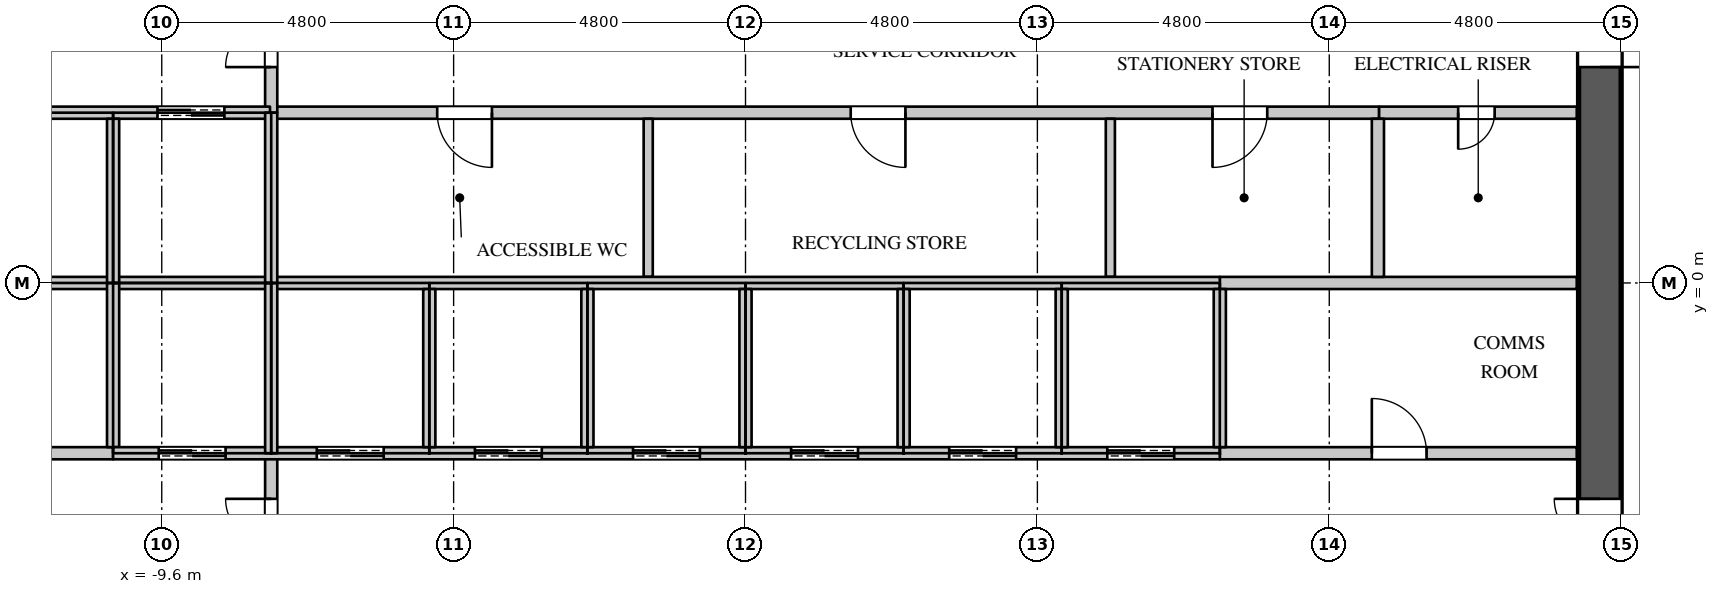
"""IFC4 building model, lengths in metres.
Left out: names, types, materials, properties, quantities, classifications, styles, units other than length and angle.
Written with IfcOpenShell. Run it as: python <this file> out.ifc"""

import sys

from ifc_helpers import new_model, si_unit, direction, frame, frame_2d, origin, place, context, subcontext, project, spatial, rectangle, extrude, element, fill, save


model = new_model("IFC4")
c1 = context("Model", 3, precision=1e-05, world=origin(), true_north=direction((0.0, 1.0)))
c2 = subcontext(c1, "Body", "Model", "MODEL_VIEW")
j1 = project(units=[si_unit("LENGTHUNIT", "METRE"), si_unit("PLANEANGLEUNIT", "RADIAN")], contexts=[c1])
p1 = place(None, origin())
s1 = spatial("IfcSite", under=j1, at=p1, CompositionType="ELEMENT")
p2 = place(p1, origin())
s2 = spatial("IfcBuilding", under=s1, at=p2, CompositionType="ELEMENT")
p3 = place(p2, frame((0.0, 0.0, 162.3)))
s3 = spatial("IfcBuildingStorey", under=s2, at=p3, CompositionType="ELEMENT", Elevation=162.3)
p4 = place(p3, frame((14.05, -11.3, 0.0), z_axis=(0.0, 0.0, 1.0), x_axis=(0.0, 1.0, 0.0)))
e1 = element("IfcWall", 1, at=p4, inside=s3, PredefinedType="SHEAR", context=c2, shape_type="SweptSolid", body=[
    extrude(rectangle(XDim=22.6, YDim=0.7, at=frame_2d((11.3, 0.0))), origin(), (0.0, 0.0, 1.0), 4.2),
])
p5 = place(p4, frame((20.35, 0.0, 0.0)))
e2 = element("IfcOpeningElement", 2, at=p5, cuts=e1, PredefinedType="OPENING", context=c2, shape_type="SweptSolid", body=[
    extrude(rectangle(XDim=1.1, YDim=2.2, at=frame_2d((0.55, 1.1))), frame((0.0, 0.36, 0.0), z_axis=(0.0, -1.0, 0.0), x_axis=(1.0, 0.0, 0.0)), (0.0, 0.0, 1.0), 0.72),
])
p6 = place(p4, frame((1.15, 0.0, 0.0)))
e3 = element("IfcOpeningElement", 3, at=p6, cuts=e1, PredefinedType="OPENING", context=c2, shape_type="SweptSolid", body=[
    extrude(rectangle(XDim=1.1, YDim=2.2, at=frame_2d((0.55, 1.1))), frame((0.0, 0.36, 0.0), z_axis=(0.0, -1.0, 0.0), x_axis=(1.0, 0.0, 0.0)), (0.0, 0.0, 1.0), 0.72),
])
p7 = place(p4, frame((14.85, 0.0, 0.0)))
e4 = element("IfcOpeningElement", 4, at=p7, cuts=e1, PredefinedType="OPENING", context=c2, shape_type="SweptSolid", body=[
    extrude(rectangle(XDim=1.5, YDim=2.4, at=frame_2d((0.75, 1.2))), frame((0.0, 0.36, 0.0), z_axis=(0.0, -1.0, 0.0), x_axis=(1.0, 0.0, 0.0)), (0.0, 0.0, 1.0), 0.72),
])
p8 = place(p4, frame((6.25, 0.0, 0.0)))
e5 = element("IfcOpeningElement", 5, at=p8, cuts=e1, PredefinedType="OPENING", context=c2, shape_type="SweptSolid", body=[
    extrude(rectangle(XDim=1.5, YDim=2.4, at=frame_2d((0.75, 1.2))), frame((0.0, 0.36, 0.0), z_axis=(0.0, -1.0, 0.0), x_axis=(1.0, 0.0, 0.0)), (0.0, 0.0, 1.0), 0.72),
])
p9 = place(p3, frame((-7.82, 2.8, 0.0), z_axis=(0.0, 0.0, 1.0), x_axis=(1.0, 0.0, 0.0)))
e6 = element("IfcWall", 6, at=p9, inside=s3, PredefinedType="PARTITIONING", context=c2, shape_type="SweptSolid", body=[
    extrude(rectangle(XDim=18.24, YDim=0.2, at=frame_2d((9.12, 0.0))), origin(), (0.0, 0.0, 1.0), 3.95),
])
p10 = place(p9, frame((2.75, 0.0, 0.0)))
e7 = element("IfcOpeningElement", 7, at=p10, cuts=e6, PredefinedType="OPENING", context=c2, shape_type="SweptSolid", body=[
    extrude(rectangle(XDim=0.9, YDim=2.2, at=frame_2d((0.45, 1.1))), frame((0.0, 0.11, 0.0), z_axis=(0.0, -1.0, 0.0), x_axis=(1.0, 0.0, 0.0)), (0.0, 0.0, 1.0), 0.22),
])
p11 = place(p9, frame((9.55, 0.0, 0.0)))
e8 = element("IfcOpeningElement", 8, at=p11, cuts=e6, PredefinedType="OPENING", context=c2, shape_type="SweptSolid", body=[
    extrude(rectangle(XDim=0.9, YDim=2.2, at=frame_2d((0.45, 1.1))), frame((0.0, 0.11, 0.0), z_axis=(0.0, -1.0, 0.0), x_axis=(1.0, 0.0, 0.0)), (0.0, 0.0, 1.0), 0.22),
])
p12 = place(p9, frame((15.5, 0.0, 0.0)))
e9 = element("IfcOpeningElement", 9, at=p12, cuts=e6, PredefinedType="OPENING", context=c2, shape_type="SweptSolid", body=[
    extrude(rectangle(XDim=0.9, YDim=2.2, at=frame_2d((0.45, 1.1))), frame((0.0, 0.11, 0.0), z_axis=(0.0, -1.0, 0.0), x_axis=(1.0, 0.0, 0.0)), (0.0, 0.0, 1.0), 0.22),
])
p13 = place(p3, frame((-7.8, -5.8, 0.0), z_axis=(0.0, 0.0, 1.0), x_axis=(0.0, 1.0, 0.0)))
e10 = element("IfcWall", 10, at=p13, inside=s3, PredefinedType="PARTITIONING", context=c2, shape_type="SweptSolid", body=[
    extrude(rectangle(XDim=3.0, YDim=0.2, at=frame_2d((1.5, 0.0))), origin(), (0.0, 0.0, 1.0), 3.95),
])
p14 = place(p13, frame((0.75, 0.0, 0.0)))
e11 = element("IfcOpeningElement", 11, at=p14, cuts=e10, PredefinedType="OPENING", context=c2, shape_type="SweptSolid", body=[
    extrude(rectangle(XDim=1.5, YDim=2.4, at=frame_2d((0.75, 1.2))), frame((0.0, 0.11, 0.0), z_axis=(0.0, -1.0, 0.0), x_axis=(1.0, 0.0, 0.0)), (0.0, 0.0, 1.0), 0.22),
])
p15 = place(p3, frame((-7.8, 2.8, 0.0), z_axis=(0.0, 0.0, 1.0), x_axis=(0.0, 1.0, 0.0)))
e12 = element("IfcWall", 12, at=p15, inside=s3, PredefinedType="PARTITIONING", context=c2, shape_type="SweptSolid", body=[
    extrude(rectangle(XDim=5.275, YDim=0.2, at=frame_2d((2.637, 0.0))), origin(), (0.0, 0.0, 1.0), 3.95),
])
p16 = place(p15, frame((0.75, 0.0, 0.0)))
e13 = element("IfcOpeningElement", 13, at=p16, cuts=e12, PredefinedType="OPENING", context=c2, shape_type="SweptSolid", body=[
    extrude(rectangle(XDim=1.5, YDim=2.4, at=frame_2d((0.75, 1.2))), frame((0.0, 0.11, 0.0), z_axis=(0.0, -1.0, 0.0), x_axis=(1.0, 0.0, 0.0)), (0.0, 0.0, 1.0), 0.22),
])
for number, where, z_axis, x_axis in (
    (14, (-1.6, 0.1, 0.0), (0.0, 0.0, 1.0), (0.0, 1.0, 0.0)),
    (15, (6.0, 0.1, 0.0), (0.0, 0.0, 1.0), (0.0, 1.0, 0.0)),
):
    element("IfcWall", number, at=place(p3, frame(where, z_axis=z_axis, x_axis=x_axis)), inside=s3, PredefinedType="PARTITIONING", context=c2, shape_type="SweptSolid", body=[
        extrude(rectangle(XDim=2.6, YDim=0.15, at=frame_2d((1.3, 0.0))), origin(), (0.0, 0.0, 1.0), 3.95),
    ])
p17 = place(p3, frame((-13.67, -2.8, 0.0), z_axis=(0.0, 0.0, 1.0), x_axis=(1.0, 0.0, 0.0)))
e16 = element("IfcWall", 16, at=p17, inside=s3, PredefinedType="PARTITIONING", context=c2, shape_type="SweptSolid", body=[
    extrude(rectangle(XDim=3.27, YDim=0.2, at=frame_2d((1.635, 0.0))), origin(), (0.0, 0.0, 1.0), 3.95),
])
p18 = place(p17, frame((1.3, 0.0, 0.0)))
e17 = element("IfcOpeningElement", 17, at=p18, cuts=e16, PredefinedType="OPENING", context=c2, shape_type="SweptSolid", body=[
    extrude(rectangle(XDim=0.6, YDim=2.0, at=frame_2d((0.3, 1.0))), frame((0.0, 0.11, 0.0), z_axis=(0.0, -1.0, 0.0), x_axis=(1.0, 0.0, 0.0)), (0.0, 0.0, 1.0), 0.22),
])
p19 = place(p3, frame((7.8, -2.8, 0.0), z_axis=(0.0, 0.0, 1.0), x_axis=(1.0, 0.0, 0.0)))
e18 = element("IfcWall", 18, at=p19, inside=s3, PredefinedType="PARTITIONING", context=c2, shape_type="SweptSolid", body=[
    extrude(rectangle(XDim=5.87, YDim=0.2, at=frame_2d((2.935, 0.0))), origin(), (0.0, 0.0, 1.0), 3.95),
])
p20 = place(p19, frame((2.5, 0.0, 0.0)))
e19 = element("IfcOpeningElement", 19, at=p20, cuts=e18, PredefinedType="OPENING", context=c2, shape_type="SweptSolid", body=[
    extrude(rectangle(XDim=0.9, YDim=2.2, at=frame_2d((0.45, 1.1))), frame((0.0, 0.11, 0.0), z_axis=(0.0, -1.0, 0.0), x_axis=(1.0, 0.0, 0.0)), (0.0, 0.0, 1.0), 0.22),
])
p21 = place(p3, frame((7.8, 0.0, 0.0), z_axis=(0.0, 0.0, 1.0), x_axis=(1.0, 0.0, 0.0)))
e20 = element("IfcWall", 20, at=p21, inside=s3, PredefinedType="PARTITIONING", context=c2, shape_type="SweptSolid", body=[
    extrude(rectangle(XDim=5.87, YDim=0.2, at=frame_2d((2.935, 0.0))), origin(), (0.0, 0.0, 1.0), 3.95),
])
p22 = place(p3, frame((10.42, 2.8, 0.0), z_axis=(0.0, 0.0, 1.0), x_axis=(1.0, 0.0, 0.0)))
e21 = element("IfcWall", 21, at=p22, inside=s3, PredefinedType="PARTITIONING", context=c2, shape_type="SweptSolid", body=[
    extrude(rectangle(XDim=3.25, YDim=0.2, at=frame_2d((1.625, 0.0))), origin(), (0.0, 0.0, 1.0), 3.95),
])
p23 = place(p22, frame((1.3, 0.0, 0.0)))
e22 = element("IfcOpeningElement", 22, at=p23, cuts=e21, PredefinedType="OPENING", context=c2, shape_type="SweptSolid", body=[
    extrude(rectangle(XDim=0.6, YDim=2.0, at=frame_2d((0.3, 1.0))), frame((0.0, 0.11, 0.0), z_axis=(0.0, -1.0, 0.0), x_axis=(1.0, 0.0, 0.0)), (0.0, 0.0, 1.0), 0.22),
])
p24 = place(p3, frame((10.4, 0.1, 0.0), z_axis=(0.0, 0.0, 1.0), x_axis=(0.0, 1.0, 0.0)))
e23 = element("IfcWall", 23, at=p24, inside=s3, PredefinedType="PARTITIONING", context=c2, shape_type="SweptSolid", body=[
    extrude(rectangle(XDim=2.6, YDim=0.2, at=frame_2d((1.3, 0.0))), origin(), (0.0, 0.0, 1.0), 3.95),
])
p25 = place(p3, frame((-13.67, 0.0, 0.0), z_axis=(0.0, 0.0, 1.0), x_axis=(1.0, 0.0, 0.0)))
e24 = element("IfcWall", 24, at=p25, inside=s3, PredefinedType="PARTITIONING", context=c2, shape_type="SweptSolid", body=[
    extrude(rectangle(XDim=21.47, YDim=0.2, at=frame_2d((10.735, 0.0))), origin(), (0.0, 0.0, 1.0), 3.95),
])
p26 = place(p3, frame((-13.67, 2.8, 0.0), z_axis=(0.0, 0.0, 1.0), x_axis=(1.0, 0.0, 0.0)))
e25 = element("IfcWall", 25, at=p26, inside=s3, PredefinedType="PARTITIONING", context=c2, shape_type="SweptSolid", body=[
    extrude(rectangle(XDim=5.85, YDim=0.2, at=frame_2d((2.925, 0.0))), origin(), (0.0, 0.0, 1.0), 3.95),
])
p27 = place(p26, frame((1.05, 0.0, 0.0)))
e26 = element("IfcOpeningElement", 26, at=p27, cuts=e25, PredefinedType="OPENING", context=c2, shape_type="SweptSolid", body=[
    extrude(rectangle(XDim=1.1, YDim=2.2, at=frame_2d((0.55, 1.1))), frame((0.0, 0.11, 0.0), z_axis=(0.0, -1.0, 0.0), x_axis=(1.0, 0.0, 0.0)), (0.0, 0.0, 1.0), 0.22),
])
p28 = place(p26, frame((4.0, 0.0, 0.0)))
e27 = element("IfcOpeningElement", 27, at=p28, cuts=e25, PredefinedType="OPENING", context=c2, shape_type="SweptSolid", body=[
    extrude(rectangle(XDim=1.1, YDim=2.2, at=frame_2d((0.55, 1.1))), frame((0.0, 0.11, 0.0), z_axis=(0.0, -1.0, 0.0), x_axis=(1.0, 0.0, 0.0)), (0.0, 0.0, 1.0), 0.22),
])
p29 = place(p3, frame((-10.4, -2.7, 0.0), z_axis=(0.0, 0.0, 1.0), x_axis=(0.0, 1.0, 0.0)))
e28 = element("IfcWall", 28, at=p29, inside=s3, PredefinedType="PARTITIONING", context=c2, shape_type="SweptSolid", body=[
    extrude(rectangle(XDim=2.7, YDim=0.2, at=frame_2d((1.35, 0.0))), origin(), (0.0, 0.0, 1.0), 3.95),
])
p30 = place(p3, frame((-10.4, -2.8, 0.0), z_axis=(0.0, 0.0, 1.0), x_axis=(1.0, 0.0, 0.0)))
e29 = element("IfcWall", 29, at=p30, inside=s3, PredefinedType="PARTITIONING", context=c2, shape_type="SweptSolid", body=[
    extrude(rectangle(XDim=18.2, YDim=0.2, at=frame_2d((9.1, 0.0))), origin(), (0.0, 0.0, 1.0), 3.95),
])
p31 = place(p30, frame((0.75, 0.0, 0.0)))
e30 = element("IfcOpeningElement", 30, at=p31, cuts=e29, PredefinedType="OPENING", context=c2, shape_type="SweptSolid", body=[
    extrude(rectangle(XDim=1.1, YDim=2.2, at=frame_2d((0.55, 1.1))), frame((0.0, 0.11, 0.0), z_axis=(0.0, -1.0, 0.0), x_axis=(1.0, 0.0, 0.0)), (0.0, 0.0, 1.0), 0.22),
])
p32 = place(p30, frame((3.35, 0.0, 0.0)))
e31 = element("IfcOpeningElement", 31, at=p32, cuts=e29, PredefinedType="OPENING", context=c2, shape_type="SweptSolid", body=[
    extrude(rectangle(XDim=1.1, YDim=2.2, at=frame_2d((0.55, 1.1))), frame((0.0, 0.11, 0.0), z_axis=(0.0, -1.0, 0.0), x_axis=(1.0, 0.0, 0.0)), (0.0, 0.0, 1.0), 0.22),
])
p33 = place(p30, frame((5.95, 0.0, 0.0)))
e32 = element("IfcOpeningElement", 32, at=p33, cuts=e29, PredefinedType="OPENING", context=c2, shape_type="SweptSolid", body=[
    extrude(rectangle(XDim=1.1, YDim=2.2, at=frame_2d((0.55, 1.1))), frame((0.0, 0.11, 0.0), z_axis=(0.0, -1.0, 0.0), x_axis=(1.0, 0.0, 0.0)), (0.0, 0.0, 1.0), 0.22),
])
p34 = place(p30, frame((8.55, 0.0, 0.0)))
e33 = element("IfcOpeningElement", 33, at=p34, cuts=e29, PredefinedType="OPENING", context=c2, shape_type="SweptSolid", body=[
    extrude(rectangle(XDim=1.1, YDim=2.2, at=frame_2d((0.55, 1.1))), frame((0.0, 0.11, 0.0), z_axis=(0.0, -1.0, 0.0), x_axis=(1.0, 0.0, 0.0)), (0.0, 0.0, 1.0), 0.22),
])
p35 = place(p30, frame((11.15, 0.0, 0.0)))
e34 = element("IfcOpeningElement", 34, at=p35, cuts=e29, PredefinedType="OPENING", context=c2, shape_type="SweptSolid", body=[
    extrude(rectangle(XDim=1.1, YDim=2.2, at=frame_2d((0.55, 1.1))), frame((0.0, 0.11, 0.0), z_axis=(0.0, -1.0, 0.0), x_axis=(1.0, 0.0, 0.0)), (0.0, 0.0, 1.0), 0.22),
])
p36 = place(p30, frame((13.75, 0.0, 0.0)))
e35 = element("IfcOpeningElement", 35, at=p36, cuts=e29, PredefinedType="OPENING", context=c2, shape_type="SweptSolid", body=[
    extrude(rectangle(XDim=1.1, YDim=2.2, at=frame_2d((0.55, 1.1))), frame((0.0, 0.11, 0.0), z_axis=(0.0, -1.0, 0.0), x_axis=(1.0, 0.0, 0.0)), (0.0, 0.0, 1.0), 0.22),
])
p37 = place(p30, frame((16.35, 0.0, 0.0)))
e36 = element("IfcOpeningElement", 36, at=p37, cuts=e29, PredefinedType="OPENING", context=c2, shape_type="SweptSolid", body=[
    extrude(rectangle(XDim=1.1, YDim=2.2, at=frame_2d((0.55, 1.1))), frame((0.0, 0.11, 0.0), z_axis=(0.0, -1.0, 0.0), x_axis=(1.0, 0.0, 0.0)), (0.0, 0.0, 1.0), 0.22),
])
p38 = place(p3, frame((-10.4, 0.0, 0.0), z_axis=(0.0, 0.0, 1.0), x_axis=(0.0, 1.0, 0.0)))
e37 = element("IfcWall", 37, at=p38, inside=s3, PredefinedType="PARTITIONING", context=c2, shape_type="SweptSolid", body=[
    extrude(rectangle(XDim=2.7, YDim=0.2, at=frame_2d((1.35, 0.0))), origin(), (0.0, 0.0, 1.0), 3.95),
])
for number, where, z_axis, x_axis in (
    (38, (-7.8, -2.8, 0.0), (0.0, 0.0, 1.0), (0.0, 1.0, 0.0)),
    (39, (-7.8, 0.0, 0.0), (0.0, 0.0, 1.0), (0.0, 1.0, 0.0)),
):
    element("IfcWall", number, at=place(p3, frame(where, z_axis=z_axis, x_axis=x_axis)), inside=s3, PredefinedType="PARTITIONING", context=c2, shape_type="SweptSolid", body=[
        extrude(rectangle(XDim=2.8, YDim=0.2, at=frame_2d((1.4, 0.0))), origin(), (0.0, 0.0, 1.0), 3.95),
    ])
for number, where, z_axis, x_axis in (
    (40, (-5.2, -2.7, 0.0), (0.0, 0.0, 1.0), (0.0, 1.0, 0.0)),
    (41, (-2.6, -2.7, 0.0), (0.0, 0.0, 1.0), (0.0, 1.0, 0.0)),
    (42, (0.0, -2.7, 0.0), (0.0, 0.0, 1.0), (0.0, 1.0, 0.0)),
    (43, (2.6, -2.7, 0.0), (0.0, 0.0, 1.0), (0.0, 1.0, 0.0)),
    (44, (5.2, -2.7, 0.0), (0.0, 0.0, 1.0), (0.0, 1.0, 0.0)),
    (45, (7.8, -2.7, 0.0), (0.0, 0.0, 1.0), (0.0, 1.0, 0.0)),
):
    element("IfcWall", number, at=place(p3, frame(where, z_axis=z_axis, x_axis=x_axis)), inside=s3, PredefinedType="PARTITIONING", context=c2, shape_type="SweptSolid", body=[
        extrude(rectangle(XDim=2.6, YDim=0.2, at=frame_2d((1.3, 0.0))), origin(), (0.0, 0.0, 1.0), 3.95),
    ])
p39 = place(p23, origin())
e46 = element("IfcDoor", 46, at=p39, inside=s3, OperationType="SINGLE_SWING_RIGHT", PredefinedType="DOOR", context=c2, shape_type="SweptSolid", body=[
    extrude(rectangle(XDim=0.6, YDim=2.0, at=frame_2d((0.3, 1.0))), frame((0.0, 0.025, 0.0), z_axis=(0.0, -1.0, 0.0), x_axis=(1.0, 0.0, 0.0)), (0.0, 0.0, 1.0), 0.05),
])
fill(e22, e46)
p40 = place(p20, origin())
e47 = element("IfcDoor", 47, at=p40, inside=s3, OperationType="SINGLE_SWING_LEFT", PredefinedType="DOOR", context=c2, shape_type="SweptSolid", body=[
    extrude(rectangle(XDim=0.9, YDim=2.2, at=frame_2d((0.45, 1.1))), frame((0.0, 0.025, 0.0), z_axis=(0.0, -1.0, 0.0), x_axis=(1.0, 0.0, 0.0)), (0.0, 0.0, 1.0), 0.05),
])
fill(e19, e47)
p41 = place(p10, origin())
e48 = element("IfcDoor", 48, at=p41, inside=s3, OperationType="SINGLE_SWING_LEFT", PredefinedType="DOOR", context=c2, shape_type="SweptSolid", body=[
    extrude(rectangle(XDim=0.9, YDim=2.2, at=frame_2d((0.45, 1.1))), frame((0.0, 0.025, 0.0), z_axis=(0.0, -1.0, 0.0), x_axis=(1.0, 0.0, 0.0)), (0.0, 0.0, 1.0), 0.05),
])
fill(e7, e48)
p42 = place(p11, origin())
e49 = element("IfcDoor", 49, at=p42, inside=s3, OperationType="SINGLE_SWING_LEFT", PredefinedType="DOOR", context=c2, shape_type="SweptSolid", body=[
    extrude(rectangle(XDim=0.9, YDim=2.2, at=frame_2d((0.45, 1.1))), frame((0.0, 0.025, 0.0), z_axis=(0.0, -1.0, 0.0), x_axis=(1.0, 0.0, 0.0)), (0.0, 0.0, 1.0), 0.05),
])
fill(e8, e49)
p43 = place(p12, origin())
e50 = element("IfcDoor", 50, at=p43, inside=s3, OperationType="SINGLE_SWING_RIGHT", PredefinedType="DOOR", context=c2, shape_type="SweptSolid", body=[
    extrude(rectangle(XDim=0.9, YDim=2.2, at=frame_2d((0.45, 1.1))), frame((0.0, 0.025, 0.0), z_axis=(0.0, -1.0, 0.0), x_axis=(1.0, 0.0, 0.0)), (0.0, 0.0, 1.0), 0.05),
])
fill(e9, e50)
p44 = place(p28, origin())
e51 = element("IfcDoor", 51, at=p44, inside=s3, OperationType="DOUBLE_DOOR_SLIDING", PredefinedType="DOOR", context=c2, shape_type="SweptSolid", body=[
    extrude(rectangle(XDim=1.1, YDim=2.2, at=frame_2d((0.55, 1.1))), frame((0.0, 0.025, 0.0), z_axis=(0.0, -1.0, 0.0), x_axis=(1.0, 0.0, 0.0)), (0.0, 0.0, 1.0), 0.05),
])
fill(e27, e51)
p45 = place(p31, origin())
e52 = element("IfcDoor", 52, at=p45, inside=s3, OperationType="DOUBLE_DOOR_SLIDING", PredefinedType="DOOR", context=c2, shape_type="SweptSolid", body=[
    extrude(rectangle(XDim=1.1, YDim=2.2, at=frame_2d((0.55, 1.1))), frame((0.0, 0.025, 0.0), z_axis=(0.0, -1.0, 0.0), x_axis=(1.0, 0.0, 0.0)), (0.0, 0.0, 1.0), 0.05),
])
fill(e30, e52)
p46 = place(p32, origin())
e53 = element("IfcDoor", 53, at=p46, inside=s3, OperationType="DOUBLE_DOOR_SLIDING", PredefinedType="DOOR", context=c2, shape_type="SweptSolid", body=[
    extrude(rectangle(XDim=1.1, YDim=2.2, at=frame_2d((0.55, 1.1))), frame((0.0, 0.025, 0.0), z_axis=(0.0, -1.0, 0.0), x_axis=(1.0, 0.0, 0.0)), (0.0, 0.0, 1.0), 0.05),
])
fill(e31, e53)
p47 = place(p33, origin())
e54 = element("IfcDoor", 54, at=p47, inside=s3, OperationType="DOUBLE_DOOR_SLIDING", PredefinedType="DOOR", context=c2, shape_type="SweptSolid", body=[
    extrude(rectangle(XDim=1.1, YDim=2.2, at=frame_2d((0.55, 1.1))), frame((0.0, 0.025, 0.0), z_axis=(0.0, -1.0, 0.0), x_axis=(1.0, 0.0, 0.0)), (0.0, 0.0, 1.0), 0.05),
])
fill(e32, e54)
p48 = place(p34, origin())
e55 = element("IfcDoor", 55, at=p48, inside=s3, OperationType="DOUBLE_DOOR_SLIDING", PredefinedType="DOOR", context=c2, shape_type="SweptSolid", body=[
    extrude(rectangle(XDim=1.1, YDim=2.2, at=frame_2d((0.55, 1.1))), frame((0.0, 0.025, 0.0), z_axis=(0.0, -1.0, 0.0), x_axis=(1.0, 0.0, 0.0)), (0.0, 0.0, 1.0), 0.05),
])
fill(e33, e55)
p49 = place(p35, origin())
e56 = element("IfcDoor", 56, at=p49, inside=s3, OperationType="DOUBLE_DOOR_SLIDING", PredefinedType="DOOR", context=c2, shape_type="SweptSolid", body=[
    extrude(rectangle(XDim=1.1, YDim=2.2, at=frame_2d((0.55, 1.1))), frame((0.0, 0.025, 0.0), z_axis=(0.0, -1.0, 0.0), x_axis=(1.0, 0.0, 0.0)), (0.0, 0.0, 1.0), 0.05),
])
fill(e34, e56)
p50 = place(p36, origin())
e57 = element("IfcDoor", 57, at=p50, inside=s3, OperationType="DOUBLE_DOOR_SLIDING", PredefinedType="DOOR", context=c2, shape_type="SweptSolid", body=[
    extrude(rectangle(XDim=1.1, YDim=2.2, at=frame_2d((0.55, 1.1))), frame((0.0, 0.025, 0.0), z_axis=(0.0, -1.0, 0.0), x_axis=(1.0, 0.0, 0.0)), (0.0, 0.0, 1.0), 0.05),
])
fill(e35, e57)
p51 = place(p37, origin())
e58 = element("IfcDoor", 58, at=p51, inside=s3, OperationType="DOUBLE_DOOR_SLIDING", PredefinedType="DOOR", context=c2, shape_type="SweptSolid", body=[
    extrude(rectangle(XDim=1.1, YDim=2.2, at=frame_2d((0.55, 1.1))), frame((0.0, 0.025, 0.0), z_axis=(0.0, -1.0, 0.0), x_axis=(1.0, 0.0, 0.0)), (0.0, 0.0, 1.0), 0.05),
])
fill(e36, e58)
p52 = place(p16, origin())
e59 = element("IfcDoor", 59, at=p52, inside=s3, OperationType="DOUBLE_DOOR_SINGLE_SWING", PredefinedType="DOOR", context=c2, shape_type="SweptSolid", body=[
    extrude(rectangle(XDim=1.5, YDim=2.4, at=frame_2d((0.75, 1.2))), frame((0.0, 0.025, 0.0), z_axis=(0.0, -1.0, 0.0), x_axis=(1.0, 0.0, 0.0)), (0.0, 0.0, 1.0), 0.05),
])
fill(e13, e59)
p53 = place(p14, origin())
e60 = element("IfcDoor", 60, at=p53, inside=s3, OperationType="DOUBLE_DOOR_SINGLE_SWING", PredefinedType="DOOR", context=c2, shape_type="SweptSolid", body=[
    extrude(rectangle(XDim=1.5, YDim=2.4, at=frame_2d((0.75, 1.2))), frame((0.0, 0.025, 0.0), z_axis=(0.0, -1.0, 0.0), x_axis=(1.0, 0.0, 0.0)), (0.0, 0.0, 1.0), 0.05),
])
fill(e11, e60)
p54 = place(p7, origin())
e61 = element("IfcDoor", 61, at=p54, inside=s3, OperationType="DOUBLE_DOOR_SINGLE_SWING", PredefinedType="DOOR", context=c2, shape_type="SweptSolid", body=[
    extrude(rectangle(XDim=1.5, YDim=2.4, at=frame_2d((0.75, 1.2))), frame((0.0, -0.295, 0.0), z_axis=(0.0, -1.0, 0.0), x_axis=(1.0, 0.0, 0.0)), (0.0, 0.0, 1.0), 0.05),
])
fill(e4, e61)
p55 = place(p8, origin())
e62 = element("IfcDoor", 62, at=p55, inside=s3, OperationType="DOUBLE_DOOR_SINGLE_SWING", PredefinedType="DOOR", context=c2, shape_type="SweptSolid", body=[
    extrude(rectangle(XDim=1.5, YDim=2.4, at=frame_2d((0.75, 1.2))), frame((0.0, 0.345, 0.0), z_axis=(0.0, -1.0, 0.0), x_axis=(1.0, 0.0, 0.0)), (0.0, 0.0, 1.0), 0.05),
])
fill(e5, e62)
save(model, sys.argv[1])
